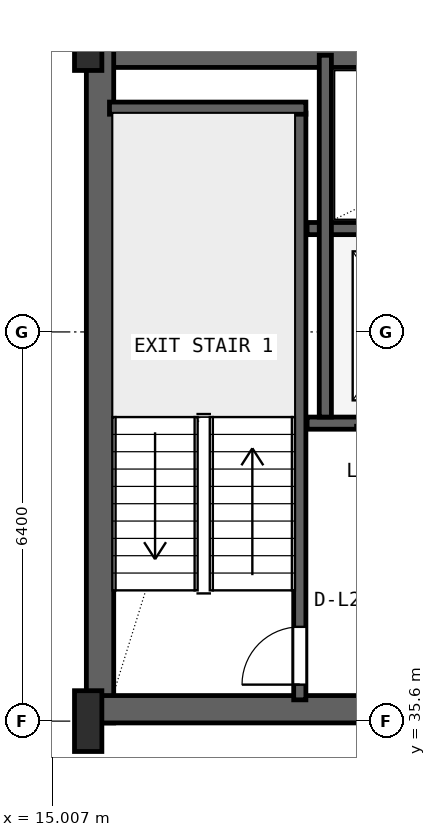
"""IFC4 building model, lengths in metres.
Left out: names, types, materials, properties, quantities, classifications, styles, units other than length and angle.
Written with IfcOpenShell. Run it as: python <this file> out.ifc"""

import sys

from ifc_helpers import new_model, si_unit, direction, frame, frame_2d, origin, origin_2d, place, context, subcontext, project, spatial, rectangle, i_section, extrude, source, transform, mapped, element, fill, save


model = new_model("IFC4")
c1 = context("Model", 3, precision=1e-05, world=origin(), true_north=direction((0.0, 1.0)))
c2 = subcontext(c1, "Body", "Model", "MODEL_VIEW")
j1 = project(units=[si_unit("LENGTHUNIT", "METRE"), si_unit("PLANEANGLEUNIT", "RADIAN")], contexts=[c1])
p1 = place(None, origin())
s1 = spatial("IfcSite", under=j1, at=p1, CompositionType="ELEMENT")
p2 = place(p1, origin())
s2 = spatial("IfcBuilding", under=s1, at=p2, CompositionType="ELEMENT")
p3 = place(p2, frame((0.0, 0.0, 103.0)))
s3 = spatial("IfcBuildingStorey", under=s2, at=p3, CompositionType="ELEMENT", Elevation=103.0)
p4 = place(p3, frame((15.6, 46.575, 0.0), z_axis=(0.0, 0.0, 1.0), x_axis=(1.0, 0.0, 0.0)))
e1 = element("IfcWall", 1, at=p4, inside=s3, PredefinedType="SHEAR", context=c2, shape_type="SweptSolid", body=[
    extrude(rectangle(XDim=36.8, YDim=0.45, at=frame_2d((18.4, 0.0))), origin(), (0.0, 0.0, 1.0), 3.55),
])
p5 = place(p3, frame((15.795, 35.57, 0.0), z_axis=(0.0, 0.0, 1.0), x_axis=(0.0, 1.0, 0.0)))
e2 = element("IfcWall", 2, at=p5, inside=s3, PredefinedType="SHEAR", context=c2, shape_type="SweptSolid", body=[
    extrude(rectangle(XDim=11.23, YDim=0.45, at=frame_2d((5.615, 0.0))), origin(), (0.0, 0.0, 1.0), 3.55),
])
p6 = place(p3, frame((15.57, 35.795, 0.0), z_axis=(0.0, 0.0, 1.0), x_axis=(1.0, 0.0, 0.0)))
e3 = element("IfcWall", 3, at=p6, inside=s3, PredefinedType="SHEAR", context=c2, shape_type="SweptSolid", body=[
    extrude(rectangle(XDim=9.23, YDim=0.45, at=frame_2d((4.615, 0.0))), origin(), (0.0, 0.0, 1.0), 3.55),
])
p7 = place(p6, frame((5.4, 0.0, 0.0)))
e4 = element("IfcOpeningElement", 4, at=p7, cuts=e3, PredefinedType="OPENING", context=c2, shape_type="SweptSolid", body=[
    extrude(rectangle(XDim=1.0, YDim=2.1, at=frame_2d((0.5, 1.05))), frame((0.0, 0.235, 0.0), z_axis=(0.0, -1.0, 0.0), x_axis=(1.0, 0.0, 0.0)), (0.0, 0.0, 1.0), 0.47),
])
m1 = source(origin(), c2, "Body", "SweptSolid", [
    extrude(i_section(OverallWidth=0.45, OverallDepth=1.0, WebThickness=0.016, FlangeThickness=0.03, FilletRadius=0.016, at=origin_2d()), origin(), (0.0, 0.0, 1.0), 3.8),
])
for number, where, z_axis, x_axis in (
    (5, (15.6, 35.6, 0.0), (0.0, 0.0, 1.0), (1.0, 0.0, 0.0)),
    (6, (15.6, 46.8, 0.0), (0.0, 0.0, 1.0), (1.0, 0.0, 0.0)),
):
    element("IfcColumn", number, at=place(p3, frame(where, z_axis=z_axis, x_axis=x_axis)), inside=s3, PredefinedType="COLUMN", context=c2, shape_type="MappedRepresentation", body=[
        mapped(m1, transform((0.0, 0.0, 0.0), x_axis=(1.0, 0.0, 0.0), y_axis=(0.0, 1.0, 0.0), z_axis=(0.0, 0.0, 1.0), scale=1.0)),
    ])
p8 = place(p3, frame((19.08, 35.95, 0.0), z_axis=(0.0, 0.0, 1.0), x_axis=(0.0, 1.0, 0.0)))
e7 = element("IfcWall", 7, at=p8, inside=s3, PredefinedType="SHEAR", context=c2, shape_type="SweptSolid", body=[
    extrude(rectangle(XDim=9.65, YDim=0.2, at=frame_2d((4.825, 0.0))), origin(), (0.0, 0.0, 1.0), 3.55),
])
p9 = place(p8, frame((0.25, 0.0, 0.0)))
e8 = element("IfcOpeningElement", 8, at=p9, cuts=e7, PredefinedType="OPENING", context=c2, shape_type="SweptSolid", body=[
    extrude(rectangle(XDim=0.95, YDim=2.1, at=frame_2d((0.475, 1.05))), frame((0.0, 0.11, 0.0), z_axis=(0.0, -1.0, 0.0), x_axis=(1.0, 0.0, 0.0)), (0.0, 0.0, 1.0), 0.22),
])
p10 = place(p3, frame((15.95, 45.68, 0.0), z_axis=(0.0, 0.0, 1.0), x_axis=(1.0, 0.0, 0.0)))
e9 = element("IfcWall", 9, at=p10, inside=s3, PredefinedType="SHEAR", context=c2, shape_type="SweptSolid", body=[
    extrude(rectangle(XDim=3.23, YDim=0.2, at=frame_2d((1.615, 0.0))), origin(), (0.0, 0.0, 1.0), 3.55),
])
p11 = place(p3, frame((19.2, 40.5, 0.0), z_axis=(0.0, 0.0, 1.0), x_axis=(1.0, 0.0, 0.0)))
e10 = element("IfcWall", 10, at=p11, inside=s3, PredefinedType="SHEAR", context=c2, shape_type="SweptSolid", body=[
    extrude(rectangle(XDim=5.52, YDim=0.2, at=frame_2d((2.76, 0.0))), origin(), (0.0, 0.0, 1.0), 3.55),
])
p12 = place(p11, frame((1.05, 0.0, 0.0)))
e11 = element("IfcOpeningElement", 11, at=p12, cuts=e10, PredefinedType="OPENING", context=c2, shape_type="SweptSolid", body=[
    extrude(rectangle(XDim=1.1, YDim=2.18, at=frame_2d((0.55, 1.09))), frame((0.0, 0.11, 0.0), z_axis=(0.0, -1.0, 0.0), x_axis=(1.0, 0.0, 0.0)), (0.0, 0.0, 1.0), 0.22),
])
p13 = place(p11, frame((3.65, 0.0, 0.0)))
e12 = element("IfcOpeningElement", 12, at=p13, cuts=e10, PredefinedType="OPENING", context=c2, shape_type="SweptSolid", body=[
    extrude(rectangle(XDim=1.1, YDim=2.18, at=frame_2d((0.55, 1.09))), frame((0.0, 0.11, 0.0), z_axis=(0.0, -1.0, 0.0), x_axis=(1.0, 0.0, 0.0)), (0.0, 0.0, 1.0), 0.22),
])
p14 = place(p3, frame((19.2, 43.7, 0.0), z_axis=(0.0, 0.0, 1.0), x_axis=(1.0, 0.0, 0.0)))
e13 = element("IfcWall", 13, at=p14, inside=s3, PredefinedType="SHEAR", context=c2, shape_type="SweptSolid", body=[
    extrude(rectangle(XDim=5.52, YDim=0.2, at=frame_2d((2.76, 0.0))), origin(), (0.0, 0.0, 1.0), 3.55),
])
p15 = place(p3, frame((19.5, 40.6, 0.0), z_axis=(0.0, 0.0, 1.0), x_axis=(0.0, 1.0, 0.0)))
e14 = element("IfcWall", 14, at=p15, inside=s3, PredefinedType="SHEAR", context=c2, shape_type="SweptSolid", body=[
    extrude(rectangle(XDim=5.95, YDim=0.2, at=frame_2d((2.975, 0.0))), origin(), (0.0, 0.0, 1.0), 3.55),
])
m2 = source(origin(), c2, "Body", "SweptSolid", [
    extrude(rectangle(XDim=0.95, YDim=2.1, at=frame_2d((0.475, 1.05))), frame((0.0, 0.025, 0.0), z_axis=(0.0, -1.0, 0.0), x_axis=(1.0, 0.0, 0.0)), (0.0, 0.0, 1.0), 0.05),
])
p16 = place(p9, origin())
e15 = element("IfcDoor", 15, at=p16, inside=s3, OperationType="SINGLE_SWING_LEFT", PredefinedType="DOOR", context=c2, shape_type="MappedRepresentation", body=[
    mapped(m2, transform((0.0, 0.0, 0.0), x_axis=(1.0, 0.0, 0.0), y_axis=(0.0, 1.0, 0.0), z_axis=(0.0, 0.0, 1.0), scale=1.0)),
])
fill(e8, e15)
save(model, sys.argv[1])
